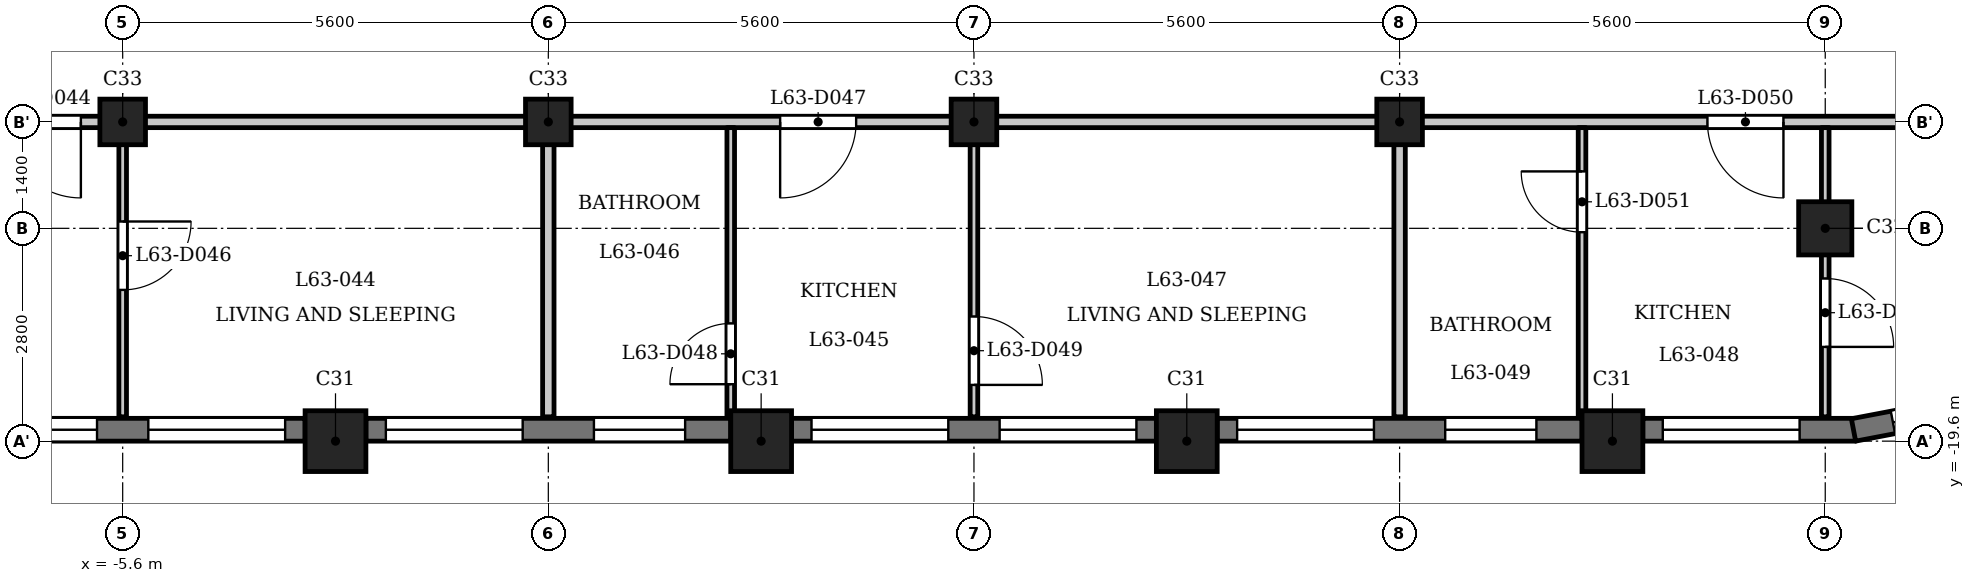
"""IFC4 building model, lengths in metres.
Left out: names, types, materials, properties, quantities, classifications, styles, units other than length and angle.
Written with IfcOpenShell. Run it as: python <this file> out.ifc"""

import sys

from ifc_helpers import new_model, si_unit, direction, frame, frame_2d, origin, origin_2d, place, context, subcontext, project, spatial, rectangle, extrude, element, fill, save


model = new_model("IFC4")
c1 = context("Model", 3, precision=1e-05, world=origin(), true_north=direction((0.0, 1.0)))
c2 = subcontext(c1, "Body", "Model", "MODEL_VIEW")
j1 = project(units=[si_unit("LENGTHUNIT", "METRE"), si_unit("PLANEANGLEUNIT", "RADIAN")], contexts=[c1])
p1 = place(None, origin())
s1 = spatial("IfcSite", under=j1, at=p1, CompositionType="ELEMENT")
p2 = place(p1, origin())
s2 = spatial("IfcBuilding", under=s1, at=p2, CompositionType="ELEMENT")
p3 = place(p2, frame((0.0, 0.0, 245.2)))
s3 = spatial("IfcBuildingStorey", under=s2, at=p3, CompositionType="ELEMENT", Elevation=245.2)
for number, where, z_axis, x_axis in (
    (1, (-2.8, -19.6, 0.0), (0.0, 0.0, 1.0), (1.0, 0.0, 0.0)),
    (2, (2.8, -19.6, 0.0), (0.0, 0.0, 1.0), (1.0, 0.0, 0.0)),
    (3, (8.4, -19.6, 0.0), (0.0, 0.0, 1.0), (1.0, 0.0, 0.0)),
    (4, (14.0, -19.6, 0.0), (0.0, 0.0, 1.0), (1.0, 0.0, 0.0)),
):
    element("IfcColumn", number, at=place(p3, frame(where, z_axis=z_axis, x_axis=x_axis)), inside=s3, PredefinedType="COLUMN", context=c2, shape_type="SweptSolid", body=[
        extrude(rectangle(XDim=0.8, YDim=0.8, at=origin_2d()), origin(), (0.0, 0.0, 1.0), 3.5),
    ])
p4 = place(p3, frame((16.8, -16.8, 0.0), z_axis=(0.0, 0.0, 1.0), x_axis=(1.0, 0.0, 0.0)))
e5 = element("IfcColumn", 5, at=p4, inside=s3, PredefinedType="COLUMN", context=c2, shape_type="SweptSolid", body=[
    extrude(rectangle(XDim=0.7, YDim=0.7, at=origin_2d()), origin(), (0.0, 0.0, 1.0), 3.5),
])
for number, where, z_axis, x_axis in (
    (6, (-5.6, -15.4, 0.0), (0.0, 0.0, 1.0), (1.0, 0.0, 0.0)),
    (7, (0.0, -15.4, 0.0), (0.0, 0.0, 1.0), (1.0, 0.0, 0.0)),
    (8, (5.6, -15.4, 0.0), (0.0, 0.0, 1.0), (1.0, 0.0, 0.0)),
    (9, (11.2, -15.4, 0.0), (0.0, 0.0, 1.0), (1.0, 0.0, 0.0)),
):
    element("IfcColumn", number, at=place(p3, frame(where, z_axis=z_axis, x_axis=x_axis)), inside=s3, PredefinedType="COLUMN", context=c2, shape_type="SweptSolid", body=[
        extrude(rectangle(XDim=0.6, YDim=0.6, at=origin_2d()), origin(), (0.0, 0.0, 1.0), 3.5),
    ])
p5 = place(p3, frame((-8.0, -19.45, 0.0), z_axis=(0.0, 0.0, 1.0), x_axis=(1.0, 0.0, 0.0)))
e10 = element("IfcWall", 10, at=p5, inside=s3, PredefinedType="SOLIDWALL", context=c2, shape_type="SweptSolid", body=[
    extrude(rectangle(XDim=4.8, YDim=0.3, at=frame_2d((2.4, 0.0))), origin(), (0.0, 0.0, 1.0), 2.55),
])
p6 = place(p5, frame((0.262, 0.0, 0.9)))
e11 = element("IfcOpeningElement", 11, at=p6, cuts=e10, PredefinedType="OPENING", context=c2, shape_type="SweptSolid", body=[
    extrude(rectangle(XDim=1.8, YDim=1.25, at=frame_2d((0.9, 0.625))), frame((0.0, 0.16, 0.0), z_axis=(0.0, -1.0, 0.0), x_axis=(1.0, 0.0, 0.0)), (0.0, 0.0, 1.0), 0.32),
])
p7 = place(p5, frame((2.738, 0.0, 0.9)))
e12 = element("IfcOpeningElement", 12, at=p7, cuts=e10, PredefinedType="OPENING", context=c2, shape_type="SweptSolid", body=[
    extrude(rectangle(XDim=1.8, YDim=1.25, at=frame_2d((0.9, 0.625))), frame((0.0, 0.16, 0.0), z_axis=(0.0, -1.0, 0.0), x_axis=(1.0, 0.0, 0.0)), (0.0, 0.0, 1.0), 0.32),
])
p8 = place(p3, frame((-2.4, -19.45, 0.0), z_axis=(0.0, 0.0, 1.0), x_axis=(1.0, 0.0, 0.0)))
e13 = element("IfcWall", 13, at=p8, inside=s3, PredefinedType="SOLIDWALL", context=c2, shape_type="SweptSolid", body=[
    extrude(rectangle(XDim=4.8, YDim=0.3, at=frame_2d((2.4, 0.0))), origin(), (0.0, 0.0, 1.0), 2.55),
])
p9 = place(p8, frame((0.262, 0.0, 0.9)))
e14 = element("IfcOpeningElement", 14, at=p9, cuts=e13, PredefinedType="OPENING", context=c2, shape_type="SweptSolid", body=[
    extrude(rectangle(XDim=1.8, YDim=1.25, at=frame_2d((0.9, 0.625))), frame((0.0, 0.16, 0.0), z_axis=(0.0, -1.0, 0.0), x_axis=(1.0, 0.0, 0.0)), (0.0, 0.0, 1.0), 0.32),
])
p10 = place(p8, frame((3.0, 0.0, 0.6)))
e15 = element("IfcOpeningElement", 15, at=p10, cuts=e13, PredefinedType="OPENING", context=c2, shape_type="SweptSolid", body=[
    extrude(rectangle(XDim=1.2, YDim=1.55, at=frame_2d((0.6, 0.775))), frame((0.0, 0.16, 0.0), z_axis=(0.0, -1.0, 0.0), x_axis=(1.0, 0.0, 0.0)), (0.0, 0.0, 1.0), 0.32),
])
p11 = place(p3, frame((3.2, -19.45, 0.0), z_axis=(0.0, 0.0, 1.0), x_axis=(1.0, 0.0, 0.0)))
e16 = element("IfcWall", 16, at=p11, inside=s3, PredefinedType="SOLIDWALL", context=c2, shape_type="SweptSolid", body=[
    extrude(rectangle(XDim=4.8, YDim=0.3, at=frame_2d((2.4, 0.0))), origin(), (0.0, 0.0, 1.0), 2.55),
])
p12 = place(p11, frame((0.262, 0.0, 0.9)))
e17 = element("IfcOpeningElement", 17, at=p12, cuts=e16, PredefinedType="OPENING", context=c2, shape_type="SweptSolid", body=[
    extrude(rectangle(XDim=1.8, YDim=1.25, at=frame_2d((0.9, 0.625))), frame((0.0, 0.16, 0.0), z_axis=(0.0, -1.0, 0.0), x_axis=(1.0, 0.0, 0.0)), (0.0, 0.0, 1.0), 0.32),
])
p13 = place(p11, frame((2.738, 0.0, 0.9)))
e18 = element("IfcOpeningElement", 18, at=p13, cuts=e16, PredefinedType="OPENING", context=c2, shape_type="SweptSolid", body=[
    extrude(rectangle(XDim=1.8, YDim=1.25, at=frame_2d((0.9, 0.625))), frame((0.0, 0.16, 0.0), z_axis=(0.0, -1.0, 0.0), x_axis=(1.0, 0.0, 0.0)), (0.0, 0.0, 1.0), 0.32),
])
p14 = place(p3, frame((8.8, -19.45, 0.0), z_axis=(0.0, 0.0, 1.0), x_axis=(1.0, 0.0, 0.0)))
e19 = element("IfcWall", 19, at=p14, inside=s3, PredefinedType="SOLIDWALL", context=c2, shape_type="SweptSolid", body=[
    extrude(rectangle(XDim=4.8, YDim=0.3, at=frame_2d((2.4, 0.0))), origin(), (0.0, 0.0, 1.0), 2.55),
])
p15 = place(p14, frame((0.262, 0.0, 0.9)))
e20 = element("IfcOpeningElement", 20, at=p15, cuts=e19, PredefinedType="OPENING", context=c2, shape_type="SweptSolid", body=[
    extrude(rectangle(XDim=1.8, YDim=1.25, at=frame_2d((0.9, 0.625))), frame((0.0, 0.16, 0.0), z_axis=(0.0, -1.0, 0.0), x_axis=(1.0, 0.0, 0.0)), (0.0, 0.0, 1.0), 0.32),
])
p16 = place(p14, frame((3.0, 0.0, 0.6)))
e21 = element("IfcOpeningElement", 21, at=p16, cuts=e19, PredefinedType="OPENING", context=c2, shape_type="SweptSolid", body=[
    extrude(rectangle(XDim=1.2, YDim=1.55, at=frame_2d((0.6, 0.775))), frame((0.0, 0.16, 0.0), z_axis=(0.0, -1.0, 0.0), x_axis=(1.0, 0.0, 0.0)), (0.0, 0.0, 1.0), 0.32),
])
p17 = place(p3, frame((14.4, -19.45, 0.0), z_axis=(0.0, 0.0, 1.0), x_axis=(1.0, 0.0, 0.0)))
e22 = element("IfcWall", 22, at=p17, inside=s3, PredefinedType="SOLIDWALL", context=c2, shape_type="SweptSolid", body=[
    extrude(rectangle(XDim=2.8, YDim=0.3, at=frame_2d((1.4, 0.0))), origin(), (0.0, 0.0, 1.0), 2.55),
])
p18 = place(p17, frame((0.262, 0.0, 0.9)))
e23 = element("IfcOpeningElement", 23, at=p18, cuts=e22, PredefinedType="OPENING", context=c2, shape_type="SweptSolid", body=[
    extrude(rectangle(XDim=1.8, YDim=1.25, at=frame_2d((0.9, 0.625))), frame((0.0, 0.16, 0.0), z_axis=(0.0, -1.0, 0.0), x_axis=(1.0, 0.0, 0.0)), (0.0, 0.0, 1.0), 0.32),
])
p19 = place(p3, frame((17.172, -19.453, 0.0), z_axis=(0.0, 0.0, 1.0), x_axis=(0.982301706131, 0.187305520826, 0.0)))
e24 = element("IfcWall", 24, at=p19, inside=s3, PredefinedType="SOLIDWALL", context=c2, shape_type="SweptSolid", body=[
    extrude(rectangle(XDim=1.856, YDim=0.3, at=frame_2d((0.928, 0.0))), origin(), (0.0, 0.0, 1.0), 2.55),
])
p20 = place(p19, frame((0.528, 0.0, 0.6)))
e25 = element("IfcOpeningElement", 25, at=p20, cuts=e24, PredefinedType="OPENING", context=c2, shape_type="SweptSolid", body=[
    extrude(rectangle(XDim=0.8, YDim=1.55, at=frame_2d((0.4, 0.775))), frame((0.0, 0.16, 0.0), z_axis=(0.0, -1.0, 0.0), x_axis=(1.0, 0.0, 0.0)), (0.0, 0.0, 1.0), 0.32),
])
p21 = place(p3, frame((-23.322, -15.4, 0.0), z_axis=(0.0, 0.0, 1.0), x_axis=(1.0, 0.0, 0.0)))
e26 = element("IfcWall", 26, at=p21, inside=s3, PredefinedType="PARTITIONING", context=c2, shape_type="SweptSolid", body=[
    extrude(rectangle(XDim=46.872, YDim=0.15, at=frame_2d((23.436, 0.0))), origin(), (0.0, 0.0, 1.0), 3.2),
])
p22 = place(p21, frame((7.172, 0.0, 0.0)))
e27 = element("IfcOpeningElement", 27, at=p22, cuts=e26, PredefinedType="OPENING", context=c2, shape_type="SweptSolid", body=[
    extrude(rectangle(XDim=1.0, YDim=2.1, at=frame_2d((0.5, 1.05))), frame((0.0, 0.085, 0.0), z_axis=(0.0, -1.0, 0.0), x_axis=(1.0, 0.0, 0.0)), (0.0, 0.0, 1.0), 0.17),
])
p23 = place(p21, frame((16.172, 0.0, 0.0)))
e28 = element("IfcOpeningElement", 28, at=p23, cuts=e26, PredefinedType="OPENING", context=c2, shape_type="SweptSolid", body=[
    extrude(rectangle(XDim=1.0, YDim=2.1, at=frame_2d((0.5, 1.05))), frame((0.0, 0.085, 0.0), z_axis=(0.0, -1.0, 0.0), x_axis=(1.0, 0.0, 0.0)), (0.0, 0.0, 1.0), 0.17),
])
p24 = place(p21, frame((26.372, 0.0, 0.0)))
e29 = element("IfcOpeningElement", 29, at=p24, cuts=e26, PredefinedType="OPENING", context=c2, shape_type="SweptSolid", body=[
    extrude(rectangle(XDim=1.0, YDim=2.1, at=frame_2d((0.5, 1.05))), frame((0.0, 0.085, 0.0), z_axis=(0.0, -1.0, 0.0), x_axis=(1.0, 0.0, 0.0)), (0.0, 0.0, 1.0), 0.17),
])
p25 = place(p21, frame((38.572, 0.0, 0.0)))
e30 = element("IfcOpeningElement", 30, at=p25, cuts=e26, PredefinedType="OPENING", context=c2, shape_type="SweptSolid", body=[
    extrude(rectangle(XDim=1.0, YDim=2.1, at=frame_2d((0.5, 1.05))), frame((0.0, 0.085, 0.0), z_axis=(0.0, -1.0, 0.0), x_axis=(1.0, 0.0, 0.0)), (0.0, 0.0, 1.0), 0.17),
])
p26 = place(p3, frame((-5.6, -19.28, 0.0), z_axis=(0.0, 0.0, 1.0), x_axis=(0.0, 1.0, 0.0)))
e31 = element("IfcWall", 31, at=p26, inside=s3, PredefinedType="PARTITIONING", context=c2, shape_type="SweptSolid", body=[
    extrude(rectangle(XDim=3.805, YDim=0.1, at=frame_2d((1.902, 0.0))), origin(), (0.0, 0.0, 1.0), 3.2),
])
p27 = place(p26, frame((1.67, 0.0, 0.0)))
e32 = element("IfcOpeningElement", 32, at=p27, cuts=e31, PredefinedType="OPENING", context=c2, shape_type="SweptSolid", body=[
    extrude(rectangle(XDim=0.9, YDim=2.1, at=frame_2d((0.45, 1.05))), frame((0.0, 0.06, 0.0), z_axis=(0.0, -1.0, 0.0), x_axis=(1.0, 0.0, 0.0)), (0.0, 0.0, 1.0), 0.12),
])
p28 = place(p3, frame((0.0, -19.28, 0.0), z_axis=(0.0, 0.0, 1.0), x_axis=(0.0, 1.0, 0.0)))
e33 = element("IfcWall", 33, at=p28, inside=s3, PredefinedType="PARTITIONING", context=c2, shape_type="SweptSolid", body=[
    extrude(rectangle(XDim=3.805, YDim=0.15, at=frame_2d((1.902, 0.0))), origin(), (0.0, 0.0, 1.0), 3.2),
])
p29 = place(p3, frame((2.4, -19.28, 0.0), z_axis=(0.0, 0.0, 1.0), x_axis=(0.0, 1.0, 0.0)))
e34 = element("IfcWall", 34, at=p29, inside=s3, PredefinedType="PARTITIONING", context=c2, shape_type="SweptSolid", body=[
    extrude(rectangle(XDim=3.805, YDim=0.1, at=frame_2d((1.902, 0.0))), origin(), (0.0, 0.0, 1.0), 3.2),
])
p30 = place(p29, frame((0.429, 0.0, 0.0)))
e35 = element("IfcOpeningElement", 35, at=p30, cuts=e34, PredefinedType="OPENING", context=c2, shape_type="SweptSolid", body=[
    extrude(rectangle(XDim=0.8, YDim=2.1, at=frame_2d((0.4, 1.05))), frame((0.0, 0.06, 0.0), z_axis=(0.0, -1.0, 0.0), x_axis=(1.0, 0.0, 0.0)), (0.0, 0.0, 1.0), 0.12),
])
p31 = place(p3, frame((5.6, -19.28, 0.0), z_axis=(0.0, 0.0, 1.0), x_axis=(0.0, 1.0, 0.0)))
e36 = element("IfcWall", 36, at=p31, inside=s3, PredefinedType="PARTITIONING", context=c2, shape_type="SweptSolid", body=[
    extrude(rectangle(XDim=3.805, YDim=0.1, at=frame_2d((1.902, 0.0))), origin(), (0.0, 0.0, 1.0), 3.2),
])
p32 = place(p31, frame((0.42, 0.0, 0.0)))
e37 = element("IfcOpeningElement", 37, at=p32, cuts=e36, PredefinedType="OPENING", context=c2, shape_type="SweptSolid", body=[
    extrude(rectangle(XDim=0.9, YDim=2.1, at=frame_2d((0.45, 1.05))), frame((0.0, 0.06, 0.0), z_axis=(0.0, -1.0, 0.0), x_axis=(1.0, 0.0, 0.0)), (0.0, 0.0, 1.0), 0.12),
])
p33 = place(p3, frame((11.2, -19.28, 0.0), z_axis=(0.0, 0.0, 1.0), x_axis=(0.0, 1.0, 0.0)))
e38 = element("IfcWall", 38, at=p33, inside=s3, PredefinedType="PARTITIONING", context=c2, shape_type="SweptSolid", body=[
    extrude(rectangle(XDim=3.805, YDim=0.15, at=frame_2d((1.902, 0.0))), origin(), (0.0, 0.0, 1.0), 3.2),
])
p34 = place(p3, frame((13.6, -19.28, 0.0), z_axis=(0.0, 0.0, 1.0), x_axis=(0.0, 1.0, 0.0)))
e39 = element("IfcWall", 39, at=p34, inside=s3, PredefinedType="PARTITIONING", context=c2, shape_type="SweptSolid", body=[
    extrude(rectangle(XDim=3.805, YDim=0.1, at=frame_2d((1.902, 0.0))), origin(), (0.0, 0.0, 1.0), 3.2),
])
p35 = place(p34, frame((2.429, 0.0, 0.0)))
e40 = element("IfcOpeningElement", 40, at=p35, cuts=e39, PredefinedType="OPENING", context=c2, shape_type="SweptSolid", body=[
    extrude(rectangle(XDim=0.8, YDim=2.1, at=frame_2d((0.4, 1.05))), frame((0.0, 0.06, 0.0), z_axis=(0.0, -1.0, 0.0), x_axis=(1.0, 0.0, 0.0)), (0.0, 0.0, 1.0), 0.12),
])
p36 = place(p3, frame((16.8, -19.28, 0.0), z_axis=(0.0, 0.0, 1.0), x_axis=(0.0, 1.0, 0.0)))
e41 = element("IfcWall", 41, at=p36, inside=s3, PredefinedType="PARTITIONING", context=c2, shape_type="SweptSolid", body=[
    extrude(rectangle(XDim=3.805, YDim=0.1, at=frame_2d((1.902, 0.0))), origin(), (0.0, 0.0, 1.0), 3.2),
])
p37 = place(p36, frame((0.92, 0.0, 0.0)))
e42 = element("IfcOpeningElement", 42, at=p37, cuts=e41, PredefinedType="OPENING", context=c2, shape_type="SweptSolid", body=[
    extrude(rectangle(XDim=0.9, YDim=2.1, at=frame_2d((0.45, 1.05))), frame((0.0, 0.06, 0.0), z_axis=(0.0, -1.0, 0.0), x_axis=(1.0, 0.0, 0.0)), (0.0, 0.0, 1.0), 0.12),
])
p38 = place(p23, origin())
e43 = element("IfcDoor", 43, at=p38, inside=s3, OperationType="SINGLE_SWING_RIGHT", PredefinedType="DOOR", context=c2, shape_type="SweptSolid", body=[
    extrude(rectangle(XDim=1.0, YDim=2.1, at=frame_2d((0.5, 1.05))), frame((0.0, 0.025, 0.0), z_axis=(0.0, -1.0, 0.0), x_axis=(1.0, 0.0, 0.0)), (0.0, 0.0, 1.0), 0.05),
])
fill(e28, e43)
p39 = place(p27, origin())
e44 = element("IfcDoor", 44, at=p39, inside=s3, OperationType="SINGLE_SWING_RIGHT", PredefinedType="DOOR", context=c2, shape_type="SweptSolid", body=[
    extrude(rectangle(XDim=0.9, YDim=2.1, at=frame_2d((0.45, 1.05))), frame((0.0, 0.025, 0.0), z_axis=(0.0, -1.0, 0.0), x_axis=(1.0, 0.0, 0.0)), (0.0, 0.0, 1.0), 0.05),
])
fill(e32, e44)
p40 = place(p24, origin())
e45 = element("IfcDoor", 45, at=p40, inside=s3, OperationType="SINGLE_SWING_LEFT", PredefinedType="DOOR", context=c2, shape_type="SweptSolid", body=[
    extrude(rectangle(XDim=1.0, YDim=2.1, at=frame_2d((0.5, 1.05))), frame((0.0, 0.025, 0.0), z_axis=(0.0, -1.0, 0.0), x_axis=(1.0, 0.0, 0.0)), (0.0, 0.0, 1.0), 0.05),
])
fill(e29, e45)
p41 = place(p30, origin())
e46 = element("IfcDoor", 46, at=p41, inside=s3, OperationType="SINGLE_SWING_RIGHT", PredefinedType="DOOR", context=c2, shape_type="SweptSolid", body=[
    extrude(rectangle(XDim=0.8, YDim=2.1, at=frame_2d((0.4, 1.05))), frame((0.0, 0.025, 0.0), z_axis=(0.0, -1.0, 0.0), x_axis=(1.0, 0.0, 0.0)), (0.0, 0.0, 1.0), 0.05),
])
fill(e35, e46)
p42 = place(p32, origin())
e47 = element("IfcDoor", 47, at=p42, inside=s3, OperationType="SINGLE_SWING_LEFT", PredefinedType="DOOR", context=c2, shape_type="SweptSolid", body=[
    extrude(rectangle(XDim=0.9, YDim=2.1, at=frame_2d((0.45, 1.05))), frame((0.0, 0.025, 0.0), z_axis=(0.0, -1.0, 0.0), x_axis=(1.0, 0.0, 0.0)), (0.0, 0.0, 1.0), 0.05),
])
fill(e37, e47)
p43 = place(p25, origin())
e48 = element("IfcDoor", 48, at=p43, inside=s3, OperationType="SINGLE_SWING_RIGHT", PredefinedType="DOOR", context=c2, shape_type="SweptSolid", body=[
    extrude(rectangle(XDim=1.0, YDim=2.1, at=frame_2d((0.5, 1.05))), frame((0.0, 0.025, 0.0), z_axis=(0.0, -1.0, 0.0), x_axis=(1.0, 0.0, 0.0)), (0.0, 0.0, 1.0), 0.05),
])
fill(e30, e48)
p44 = place(p35, origin())
e49 = element("IfcDoor", 49, at=p44, inside=s3, OperationType="SINGLE_SWING_LEFT", PredefinedType="DOOR", context=c2, shape_type="SweptSolid", body=[
    extrude(rectangle(XDim=0.8, YDim=2.1, at=frame_2d((0.4, 1.05))), frame((0.0, 0.025, 0.0), z_axis=(0.0, -1.0, 0.0), x_axis=(1.0, 0.0, 0.0)), (0.0, 0.0, 1.0), 0.05),
])
fill(e40, e49)
p45 = place(p37, origin())
e50 = element("IfcDoor", 50, at=p45, inside=s3, OperationType="SINGLE_SWING_LEFT", PredefinedType="DOOR", context=c2, shape_type="SweptSolid", body=[
    extrude(rectangle(XDim=0.9, YDim=2.1, at=frame_2d((0.45, 1.05))), frame((0.0, 0.025, 0.0), z_axis=(0.0, -1.0, 0.0), x_axis=(1.0, 0.0, 0.0)), (0.0, 0.0, 1.0), 0.05),
])
fill(e42, e50)
p46 = place(p6, origin())
e51 = element("IfcWindow", 51, at=p46, inside=s3, PartitioningType="SINGLE_PANEL", PredefinedType="WINDOW", context=c2, shape_type="SweptSolid", body=[
    extrude(rectangle(XDim=1.8, YDim=1.25, at=frame_2d((0.9, 0.625))), frame((0.0, 0.03, 0.0), z_axis=(0.0, -1.0, 0.0), x_axis=(1.0, 0.0, 0.0)), (0.0, 0.0, 1.0), 0.06),
])
fill(e11, e51)
p47 = place(p7, origin())
e52 = element("IfcWindow", 52, at=p47, inside=s3, PartitioningType="SINGLE_PANEL", PredefinedType="WINDOW", context=c2, shape_type="SweptSolid", body=[
    extrude(rectangle(XDim=1.8, YDim=1.25, at=frame_2d((0.9, 0.625))), frame((0.0, 0.03, 0.0), z_axis=(0.0, -1.0, 0.0), x_axis=(1.0, 0.0, 0.0)), (0.0, 0.0, 1.0), 0.06),
])
fill(e12, e52)
p48 = place(p9, origin())
e53 = element("IfcWindow", 53, at=p48, inside=s3, PartitioningType="SINGLE_PANEL", PredefinedType="WINDOW", context=c2, shape_type="SweptSolid", body=[
    extrude(rectangle(XDim=1.8, YDim=1.25, at=frame_2d((0.9, 0.625))), frame((0.0, 0.03, 0.0), z_axis=(0.0, -1.0, 0.0), x_axis=(1.0, 0.0, 0.0)), (0.0, 0.0, 1.0), 0.06),
])
fill(e14, e53)
p49 = place(p10, origin())
e54 = element("IfcWindow", 54, at=p49, inside=s3, PartitioningType="SINGLE_PANEL", PredefinedType="WINDOW", context=c2, shape_type="SweptSolid", body=[
    extrude(rectangle(XDim=1.2, YDim=1.55, at=frame_2d((0.6, 0.775))), frame((0.0, 0.03, 0.0), z_axis=(0.0, -1.0, 0.0), x_axis=(1.0, 0.0, 0.0)), (0.0, 0.0, 1.0), 0.06),
])
fill(e15, e54)
p50 = place(p12, origin())
e55 = element("IfcWindow", 55, at=p50, inside=s3, PartitioningType="SINGLE_PANEL", PredefinedType="WINDOW", context=c2, shape_type="SweptSolid", body=[
    extrude(rectangle(XDim=1.8, YDim=1.25, at=frame_2d((0.9, 0.625))), frame((0.0, 0.03, 0.0), z_axis=(0.0, -1.0, 0.0), x_axis=(1.0, 0.0, 0.0)), (0.0, 0.0, 1.0), 0.06),
])
fill(e17, e55)
p51 = place(p13, origin())
e56 = element("IfcWindow", 56, at=p51, inside=s3, PartitioningType="SINGLE_PANEL", PredefinedType="WINDOW", context=c2, shape_type="SweptSolid", body=[
    extrude(rectangle(XDim=1.8, YDim=1.25, at=frame_2d((0.9, 0.625))), frame((0.0, 0.03, 0.0), z_axis=(0.0, -1.0, 0.0), x_axis=(1.0, 0.0, 0.0)), (0.0, 0.0, 1.0), 0.06),
])
fill(e18, e56)
p52 = place(p15, origin())
e57 = element("IfcWindow", 57, at=p52, inside=s3, PartitioningType="SINGLE_PANEL", PredefinedType="WINDOW", context=c2, shape_type="SweptSolid", body=[
    extrude(rectangle(XDim=1.8, YDim=1.25, at=frame_2d((0.9, 0.625))), frame((0.0, 0.03, 0.0), z_axis=(0.0, -1.0, 0.0), x_axis=(1.0, 0.0, 0.0)), (0.0, 0.0, 1.0), 0.06),
])
fill(e20, e57)
p53 = place(p16, origin())
e58 = element("IfcWindow", 58, at=p53, inside=s3, PartitioningType="SINGLE_PANEL", PredefinedType="WINDOW", context=c2, shape_type="SweptSolid", body=[
    extrude(rectangle(XDim=1.2, YDim=1.55, at=frame_2d((0.6, 0.775))), frame((0.0, 0.03, 0.0), z_axis=(0.0, -1.0, 0.0), x_axis=(1.0, 0.0, 0.0)), (0.0, 0.0, 1.0), 0.06),
])
fill(e21, e58)
p54 = place(p18, origin())
e59 = element("IfcWindow", 59, at=p54, inside=s3, PartitioningType="SINGLE_PANEL", PredefinedType="WINDOW", context=c2, shape_type="SweptSolid", body=[
    extrude(rectangle(XDim=1.8, YDim=1.25, at=frame_2d((0.9, 0.625))), frame((0.0, 0.03, 0.0), z_axis=(0.0, -1.0, 0.0), x_axis=(1.0, 0.0, 0.0)), (0.0, 0.0, 1.0), 0.06),
])
fill(e23, e59)
p55 = place(p20, origin())
e60 = element("IfcWindow", 60, at=p55, inside=s3, PartitioningType="SINGLE_PANEL", PredefinedType="WINDOW", context=c2, shape_type="SweptSolid", body=[
    extrude(rectangle(XDim=0.8, YDim=1.55, at=frame_2d((0.4, 0.775))), frame((0.0, 0.03, 0.0), z_axis=(0.0, -1.0, 0.0), x_axis=(1.0, 0.0, 0.0)), (0.0, 0.0, 1.0), 0.06),
])
fill(e25, e60)
save(model, sys.argv[1])
